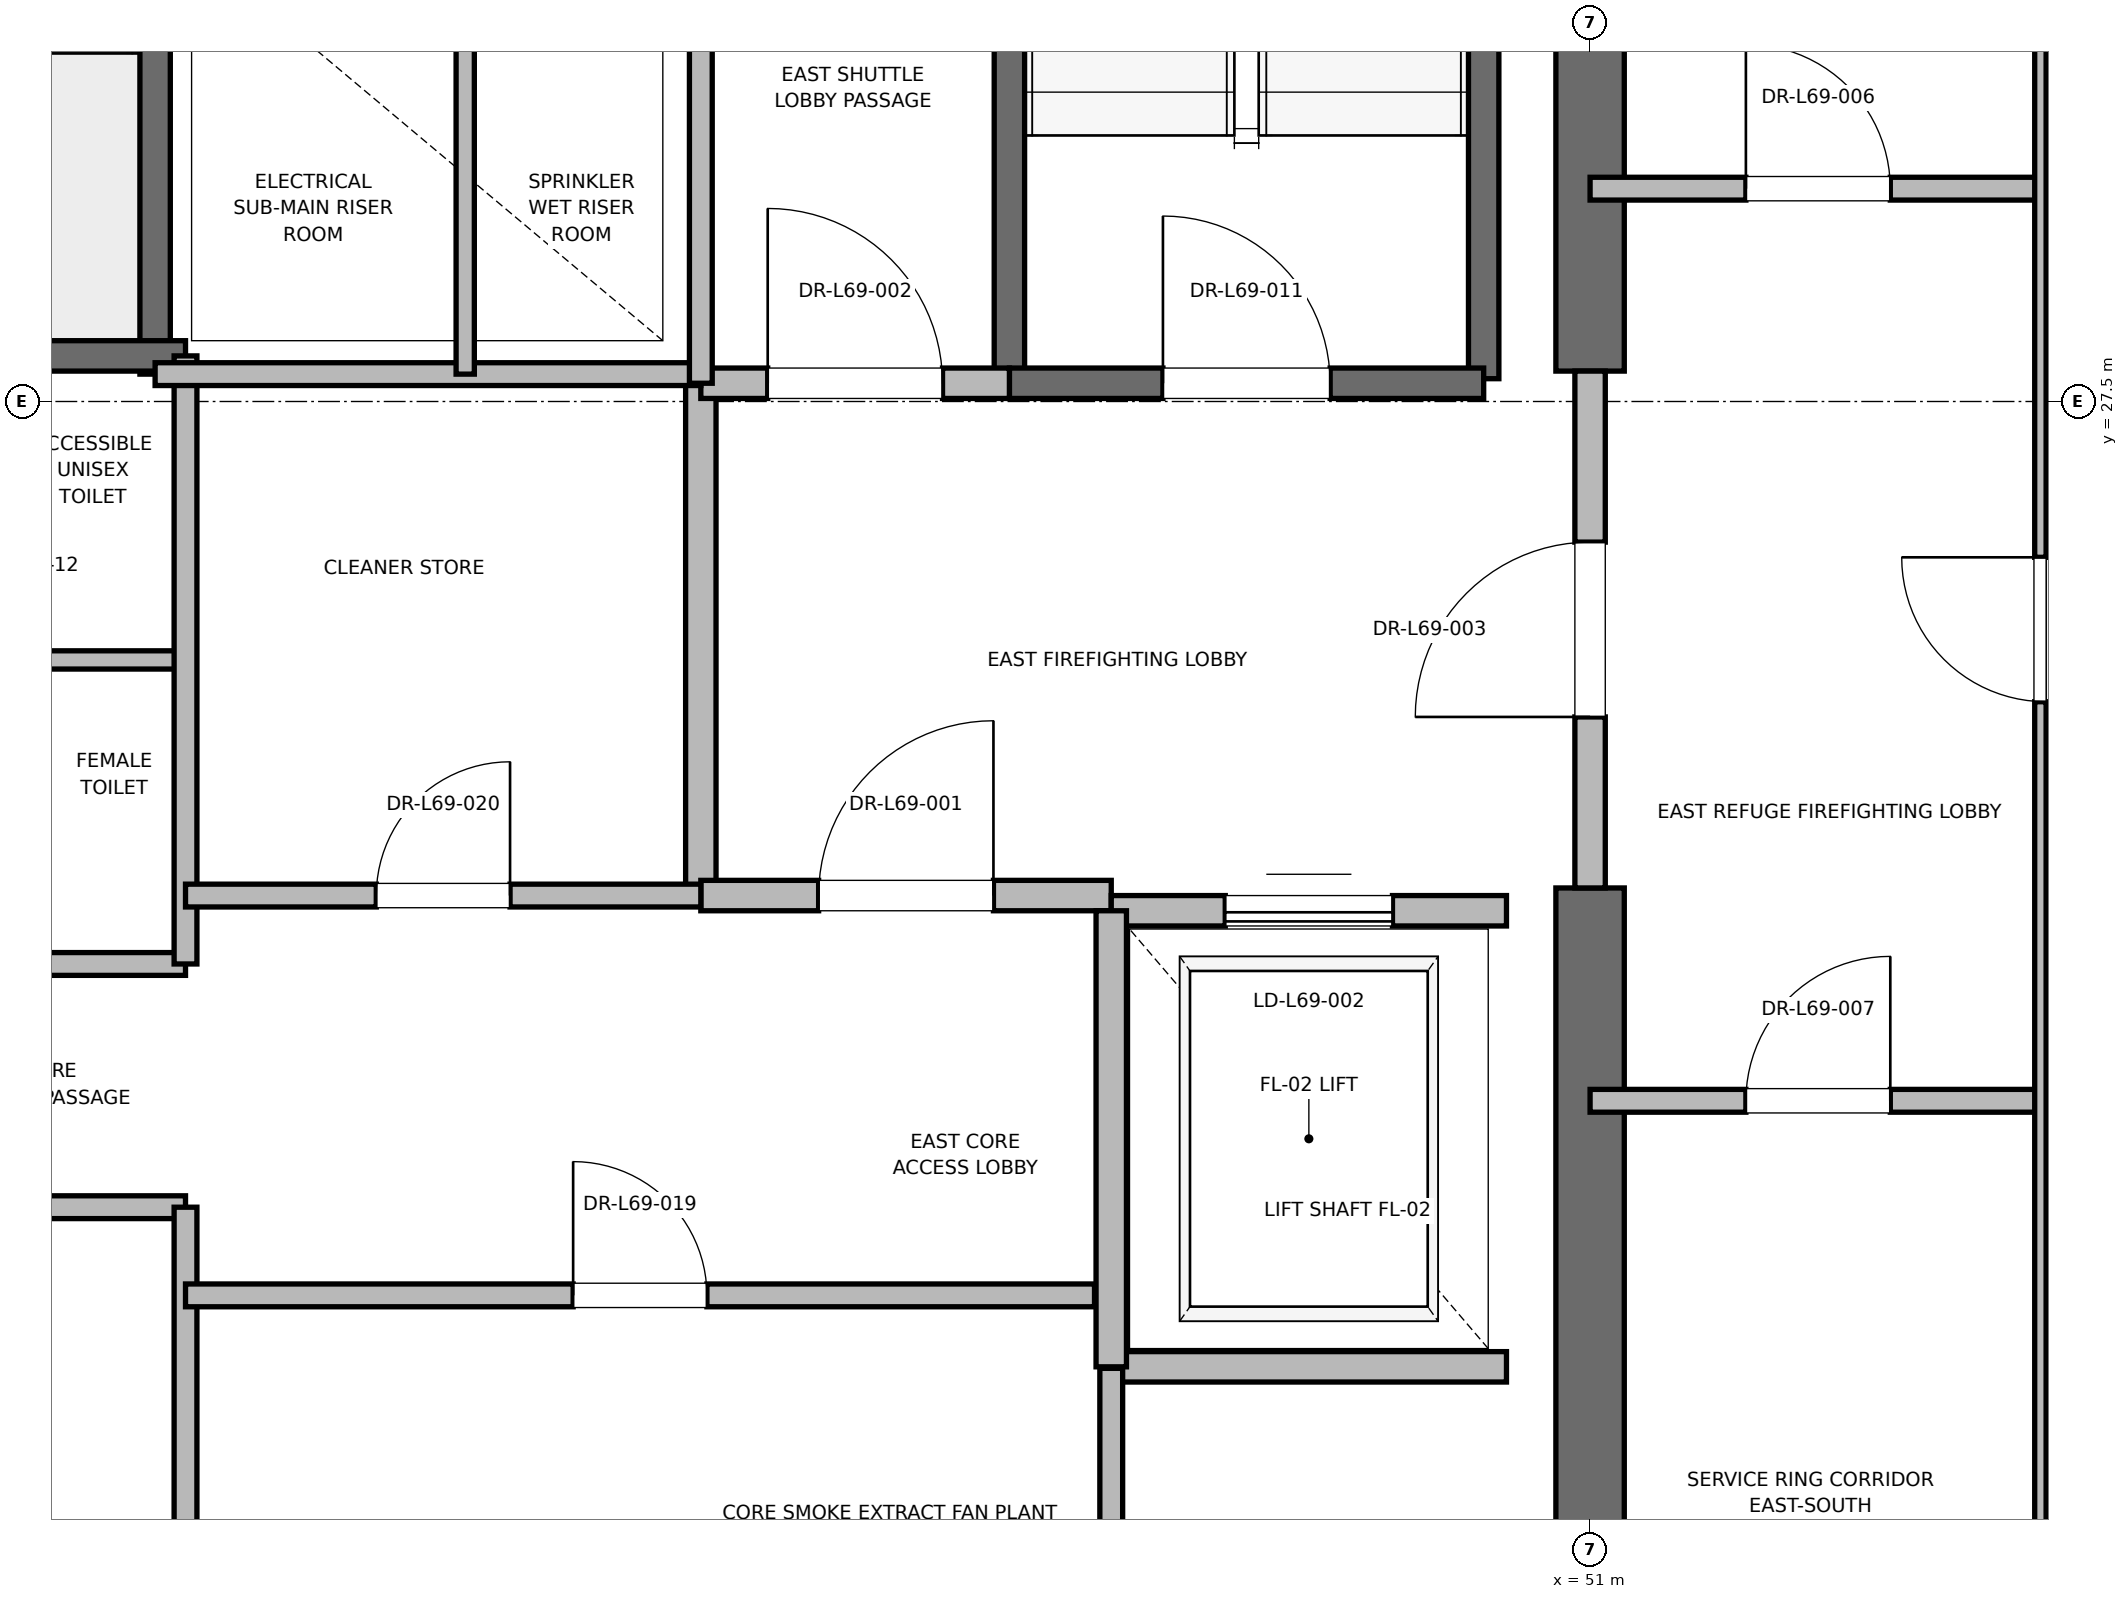
"""IFC4 building model, lengths in metres.
Left out: names, types, materials, properties, quantities, classifications, styles, units other than length and angle.
Written with IfcOpenShell. Run it as: python <this file> out.ifc"""

import sys

from ifc_helpers import new_model, si_unit, direction, frame, frame_2d, origin, place, context, subcontext, project, spatial, rectangle, extrude, element, fill, save


model = new_model("IFC4")
c1 = context("Model", 3, precision=1e-05, world=origin(), true_north=direction((0.0, 1.0)))
c2 = subcontext(c1, "Body", "Model", "MODEL_VIEW")
j1 = project(units=[si_unit("LENGTHUNIT", "METRE"), si_unit("PLANEANGLEUNIT", "RADIAN")], contexts=[c1])
p1 = place(None, origin())
s1 = spatial("IfcSite", under=j1, at=p1, CompositionType="ELEMENT")
p2 = place(p1, origin())
s2 = spatial("IfcBuilding", under=s1, at=p2, CompositionType="ELEMENT")
p3 = place(p2, frame((0.0, 0.0, 295.2)))
s3 = spatial("IfcBuildingStorey", under=s2, at=p3, CompositionType="ELEMENT", Elevation=295.2)
p4 = place(p3, frame((51.0, 18.5, 0.0), z_axis=(0.0, 0.0, 1.0), x_axis=(0.0, 1.0, 0.0)))
e1 = element("IfcWall", 1, at=p4, inside=s3, PredefinedType="SHEAR", context=c2, shape_type="SweptSolid", body=[
    extrude(rectangle(XDim=5.8, YDim=0.45, at=frame_2d((2.9, 0.0))), origin(), (0.0, 0.0, 1.0), 5.5),
])
p5 = place(p3, frame((51.0, 27.7, 0.0), z_axis=(0.0, 0.0, 1.0), x_axis=(0.0, 1.0, 0.0)))
e2 = element("IfcWall", 2, at=p5, inside=s3, PredefinedType="SHEAR", context=c2, shape_type="SweptSolid", body=[
    extrude(rectangle(XDim=8.8, YDim=0.45, at=frame_2d((4.4, 0.0))), origin(), (0.0, 0.0, 1.0), 5.5),
])
p6 = place(p3, frame((50.3, 27.65, 0.0), z_axis=(0.0, 0.0, 1.0), x_axis=(0.0, 1.0, 0.0)))
e3 = element("IfcWall", 3, at=p6, inside=s3, PredefinedType="SOLIDWALL", context=c2, shape_type="SweptSolid", body=[
    extrude(rectangle(XDim=8.15, YDim=0.2, at=frame_2d((4.075, 0.0))), origin(), (0.0, 0.0, 1.0), 5.5),
])
p7 = place(p3, frame((47.18, 27.62, 0.0), z_axis=(0.0, 0.0, 1.0), x_axis=(0.0, 1.0, 0.0)))
e4 = element("IfcWall", 4, at=p7, inside=s3, PredefinedType="SOLIDWALL", context=c2, shape_type="SweptSolid", body=[
    extrude(rectangle(XDim=8.18, YDim=0.2, at=frame_2d((4.09, 0.0))), origin(), (0.0, 0.0, 1.0), 5.5),
])
p8 = place(p3, frame((47.18, 27.62, 0.0), z_axis=(0.0, 0.0, 1.0), x_axis=(1.0, 0.0, 0.0)))
e5 = element("IfcWall", 5, at=p8, inside=s3, PredefinedType="SOLIDWALL", context=c2, shape_type="SweptSolid", body=[
    extrude(rectangle(XDim=3.12, YDim=0.2, at=frame_2d((1.56, 0.0))), origin(), (0.0, 0.0, 1.0), 5.5),
])
p9 = place(p8, frame((1.01, 0.0, 0.0)))
e6 = element("IfcOpeningElement", 6, at=p9, cuts=e5, PredefinedType="OPENING", context=c2, shape_type="SweptSolid", body=[
    extrude(rectangle(XDim=1.1, YDim=2.15, at=frame_2d((0.55, 1.075))), frame((0.0, 0.1, 0.0), z_axis=(0.0, -1.0, 0.0), x_axis=(1.0, 0.0, 0.0)), (0.0, 0.0, 1.0), 0.2),
])
p10 = place(p3, frame((41.56, 27.68, 0.0), z_axis=(0.0, 0.0, 1.0), x_axis=(0.0, 1.0, 0.0)))
e7 = element("IfcWall", 7, at=p10, inside=s3, PredefinedType="SOLIDWALL", context=c2, shape_type="SweptSolid", body=[
    extrude(rectangle(XDim=8.57, YDim=0.2, at=frame_2d((4.285, 0.0))), origin(), (0.0, 0.0, 1.0), 5.5),
])
p11 = place(p3, frame((38.44, 27.8, 0.0), z_axis=(0.0, 0.0, 1.0), x_axis=(1.0, 0.0, 0.0)))
e8 = element("IfcWall", 8, at=p11, inside=s3, PredefinedType="SOLIDWALL", context=c2, shape_type="SweptSolid", body=[
    extrude(rectangle(XDim=3.32, YDim=0.2, at=frame_2d((1.66, 0.0))), origin(), (0.0, 0.0, 1.0), 5.5),
])
p12 = place(p3, frame((45.15, 24.25, 0.0), z_axis=(0.0, 0.0, 1.0), x_axis=(0.0, 1.0, 0.0)))
e9 = element("IfcWall", 9, at=p12, inside=s3, PredefinedType="PARTITIONING", context=c2, shape_type="SweptSolid", body=[
    extrude(rectangle(XDim=3.37, YDim=0.2, at=frame_2d((1.685, 0.0))), origin(), (0.0, 0.0, 1.0), 5.5),
])
p13 = place(p3, frame((45.15, 24.25, 0.0), z_axis=(0.0, 0.0, 1.0), x_axis=(1.0, 0.0, 0.0)))
e10 = element("IfcWall", 10, at=p13, inside=s3, PredefinedType="PARTITIONING", context=c2, shape_type="SweptSolid", body=[
    extrude(rectangle(XDim=2.7, YDim=0.2, at=frame_2d((1.35, 0.0))), origin(), (0.0, 0.0, 1.0), 5.5),
])
p14 = place(p13, frame((0.775, 0.0, 0.0)))
e11 = element("IfcOpeningElement", 11, at=p14, cuts=e10, PredefinedType="OPENING", context=c2, shape_type="SweptSolid", body=[
    extrude(rectangle(XDim=1.15, YDim=2.2, at=frame_2d((0.575, 1.1))), frame((0.0, 0.1, 0.0), z_axis=(0.0, -1.0, 0.0), x_axis=(1.0, 0.0, 0.0)), (0.0, 0.0, 1.0), 0.2),
])
p15 = place(p3, frame((45.15, 27.62, 0.0), z_axis=(0.0, 0.0, 1.0), x_axis=(1.0, 0.0, 0.0)))
e12 = element("IfcWall", 12, at=p15, inside=s3, PredefinedType="PARTITIONING", context=c2, shape_type="SweptSolid", body=[
    extrude(rectangle(XDim=2.03, YDim=0.2, at=frame_2d((1.015, 0.0))), origin(), (0.0, 0.0, 1.0), 5.5),
])
p16 = place(p15, frame((0.44, 0.0, 0.0)))
e13 = element("IfcOpeningElement", 13, at=p16, cuts=e12, PredefinedType="OPENING", context=c2, shape_type="SweptSolid", body=[
    extrude(rectangle(XDim=1.15, YDim=2.2, at=frame_2d((0.575, 1.1))), frame((0.0, 0.1, 0.0), z_axis=(0.0, -1.0, 0.0), x_axis=(1.0, 0.0, 0.0)), (0.0, 0.0, 1.0), 0.2),
])
p17 = place(p3, frame((51.0, 24.3, 0.0), z_axis=(0.0, 0.0, 1.0), x_axis=(0.0, 1.0, 0.0)))
e14 = element("IfcWall", 14, at=p17, inside=s3, PredefinedType="PARTITIONING", context=c2, shape_type="SweptSolid", body=[
    extrude(rectangle(XDim=3.4, YDim=0.2, at=frame_2d((1.7, 0.0))), origin(), (0.0, 0.0, 1.0), 4.58),
])
p18 = place(p17, frame((1.125, 0.0, 0.0)))
e15 = element("IfcOpeningElement", 15, at=p18, cuts=e14, PredefinedType="OPENING", context=c2, shape_type="SweptSolid", body=[
    extrude(rectangle(XDim=1.15, YDim=2.2, at=frame_2d((0.575, 1.1))), frame((0.0, 0.1, 0.0), z_axis=(0.0, -1.0, 0.0), x_axis=(1.0, 0.0, 0.0)), (0.0, 0.0, 1.0), 0.2),
])
p19 = place(p3, frame((47.85, 21.15, 0.0), z_axis=(0.0, 0.0, 1.0), x_axis=(1.0, 0.0, 0.0)))
e16 = element("IfcWall", 16, at=p19, inside=s3, PredefinedType="SOLIDWALL", context=c2, shape_type="SweptSolid", body=[
    extrude(rectangle(XDim=2.6, YDim=0.2, at=frame_2d((1.3, 0.0))), origin(), (0.0, 0.0, 1.0), 5.5),
])
p20 = place(p3, frame((50.45, 24.15, 0.0), z_axis=(0.0, 0.0, 1.0), x_axis=(-1.0, 0.0, 0.0)))
e17 = element("IfcWall", 17, at=p20, inside=s3, PredefinedType="SOLIDWALL", context=c2, shape_type="SweptSolid", body=[
    extrude(rectangle(XDim=2.6, YDim=0.2, at=frame_2d((1.3, 0.0))), origin(), (0.0, 0.0, 1.0), 4.58),
])
p21 = place(p20, frame((0.75, 0.0, 0.0)))
e18 = element("IfcOpeningElement", 18, at=p21, cuts=e17, PredefinedType="OPENING", context=c2, shape_type="SweptSolid", body=[
    extrude(rectangle(XDim=1.1, YDim=2.2, at=frame_2d((0.55, 1.1))), frame((0.0, 0.1, 0.0), z_axis=(0.0, -1.0, 0.0), x_axis=(1.0, 0.0, 0.0)), (0.0, 0.0, 1.0), 0.2),
])
p22 = place(p3, frame((47.85, 24.15, 0.0), z_axis=(0.0, 0.0, 1.0), x_axis=(0.0, -1.0, 0.0)))
e19 = element("IfcWall", 19, at=p22, inside=s3, PredefinedType="SOLIDWALL", context=c2, shape_type="SweptSolid", body=[
    extrude(rectangle(XDim=3.0, YDim=0.2, at=frame_2d((1.5, 0.0))), origin(), (0.0, 0.0, 1.0), 5.5),
])
for number, where, z_axis, x_axis in (
    (20, (39.95, 22.2, 0.0), (0.0, 0.0, 1.0), (1.0, 0.0, 0.0)),
    (21, (39.95, 23.8, 0.0), (0.0, 0.0, 1.0), (1.0, 0.0, 0.0)),
):
    element("IfcWall", number, at=place(p3, frame(where, z_axis=z_axis, x_axis=x_axis)), inside=s3, PredefinedType="PARTITIONING", context=c2, shape_type="SweptSolid", body=[
        extrude(rectangle(XDim=1.81, YDim=0.15, at=frame_2d((0.905, 0.0))), origin(), (0.0, 0.0, 1.0), 2.85),
    ])
p23 = place(p3, frame((39.95, 25.8, 0.0), z_axis=(0.0, 0.0, 1.0), x_axis=(1.0, 0.0, 0.0)))
e22 = element("IfcWall", 22, at=p23, inside=s3, PredefinedType="PARTITIONING", context=c2, shape_type="SweptSolid", body=[
    extrude(rectangle(XDim=1.81, YDim=0.12, at=frame_2d((0.905, 0.0))), origin(), (0.0, 0.0, 1.0), 2.85),
])
p24 = place(p3, frame((41.76, 18.6, 0.0), z_axis=(0.0, 0.0, 1.0), x_axis=(0.0, 1.0, 0.0)))
e23 = element("IfcWall", 23, at=p24, inside=s3, PredefinedType="PARTITIONING", context=c2, shape_type="SweptSolid", body=[
    extrude(rectangle(XDim=3.6, YDim=0.15, at=frame_2d((1.8, 0.0))), origin(), (0.0, 0.0, 1.0), 2.85),
])
p25 = place(p3, frame((41.76, 23.8, 0.0), z_axis=(0.0, 0.0, 1.0), x_axis=(0.0, 1.0, 0.0)))
e24 = element("IfcWall", 24, at=p25, inside=s3, PredefinedType="PARTITIONING", context=c2, shape_type="SweptSolid", body=[
    extrude(rectangle(XDim=4.0, YDim=0.15, at=frame_2d((2.0, 0.0))), origin(), (0.0, 0.0, 1.0), 2.85),
])
p26 = place(p3, frame((41.56, 27.68, 0.0), z_axis=(0.0, 0.0, 1.0), x_axis=(1.0, 0.0, 0.0)))
e25 = element("IfcWall", 25, at=p26, inside=s3, PredefinedType="PARTITIONING", context=c2, shape_type="SweptSolid", body=[
    extrude(rectangle(XDim=3.59, YDim=0.15, at=frame_2d((1.795, 0.0))), origin(), (0.0, 0.0, 1.0), 2.85),
])
p27 = place(p3, frame((47.85, 18.6, 0.0), z_axis=(0.0, 0.0, 1.0), x_axis=(0.0, 1.0, 0.0)))
e26 = element("IfcWall", 26, at=p27, inside=s3, PredefinedType="PARTITIONING", context=c2, shape_type="SweptSolid", body=[
    extrude(rectangle(XDim=2.54, YDim=0.15, at=frame_2d((1.27, 0.0))), origin(), (0.0, 0.0, 1.0), 2.85),
])
p28 = place(p3, frame((41.76, 21.62, 0.0), z_axis=(0.0, 0.0, 1.0), x_axis=(1.0, 0.0, 0.0)))
e27 = element("IfcWall", 27, at=p28, inside=s3, PredefinedType="PARTITIONING", context=c2, shape_type="SweptSolid", body=[
    extrude(rectangle(XDim=5.98, YDim=0.15, at=frame_2d((2.99, 0.0))), origin(), (0.0, 0.0, 1.0), 2.85),
])
p29 = place(p28, frame((2.55, 0.0, 0.0)))
e28 = element("IfcOpeningElement", 28, at=p29, cuts=e27, PredefinedType="OPENING", context=c2, shape_type="SweptSolid", body=[
    extrude(rectangle(XDim=0.88, YDim=2.1, at=frame_2d((0.44, 1.05))), frame((0.0, 0.075, 0.0), z_axis=(0.0, -1.0, 0.0), x_axis=(1.0, 0.0, 0.0)), (0.0, 0.0, 1.0), 0.15),
])
p30 = place(p3, frame((41.76, 24.25, 0.0), z_axis=(0.0, 0.0, 1.0), x_axis=(1.0, 0.0, 0.0)))
e29 = element("IfcWall", 29, at=p30, inside=s3, PredefinedType="PARTITIONING", context=c2, shape_type="SweptSolid", body=[
    extrude(rectangle(XDim=3.39, YDim=0.15, at=frame_2d((1.695, 0.0))), origin(), (0.0, 0.0, 1.0), 2.85),
])
p31 = place(p30, frame((1.255, 0.0, 0.0)))
e30 = element("IfcOpeningElement", 30, at=p31, cuts=e29, PredefinedType="OPENING", context=c2, shape_type="SweptSolid", body=[
    extrude(rectangle(XDim=0.88, YDim=2.1, at=frame_2d((0.44, 1.05))), frame((0.0, 0.075, 0.0), z_axis=(0.0, -1.0, 0.0), x_axis=(1.0, 0.0, 0.0)), (0.0, 0.0, 1.0), 0.15),
])
p32 = place(p3, frame((45.15, 27.62, 0.0), z_axis=(0.0, 0.0, 1.0), x_axis=(0.0, 1.0, 0.0)))
e31 = element("IfcWall", 31, at=p32, inside=s3, PredefinedType="PARTITIONING", context=c2, shape_type="SweptSolid", body=[
    extrude(rectangle(XDim=3.1, YDim=0.15, at=frame_2d((1.55, 0.0))), origin(), (0.0, 0.0, 1.0), 2.85),
])
p33 = place(p3, frame((43.6, 27.68, 0.0), z_axis=(0.0, 0.0, 1.0), x_axis=(0.0, 1.0, 0.0)))
e32 = element("IfcWall", 32, at=p33, inside=s3, PredefinedType="PARTITIONING", context=c2, shape_type="SweptSolid", body=[
    extrude(rectangle(XDim=3.04, YDim=0.12, at=frame_2d((1.52, 0.0))), origin(), (0.0, 0.0, 1.0), 2.85),
])
p34 = place(p3, frame((51.0, 22.9, 0.0), z_axis=(0.0, 0.0, 1.0), x_axis=(1.0, 0.0, 0.0)))
e33 = element("IfcWall", 33, at=p34, inside=s3, PredefinedType="PARTITIONING", context=c2, shape_type="SweptSolid", body=[
    extrude(rectangle(XDim=3.0, YDim=0.15, at=frame_2d((1.5, 0.0))), origin(), (0.0, 0.0, 1.0), 2.85),
])
p35 = place(p34, frame((1.025, 0.0, 0.0)))
e34 = element("IfcOpeningElement", 34, at=p35, cuts=e33, PredefinedType="OPENING", context=c2, shape_type="SweptSolid", body=[
    extrude(rectangle(XDim=0.95, YDim=2.15, at=frame_2d((0.475, 1.075))), frame((0.0, 0.075, 0.0), z_axis=(0.0, -1.0, 0.0), x_axis=(1.0, 0.0, 0.0)), (0.0, 0.0, 1.0), 0.15),
])
p36 = place(p3, frame((51.0, 28.9, 0.0), z_axis=(0.0, 0.0, 1.0), x_axis=(1.0, 0.0, 0.0)))
e35 = element("IfcWall", 35, at=p36, inside=s3, PredefinedType="PARTITIONING", context=c2, shape_type="SweptSolid", body=[
    extrude(rectangle(XDim=3.0, YDim=0.15, at=frame_2d((1.5, 0.0))), origin(), (0.0, 0.0, 1.0), 2.85),
])
p37 = place(p36, frame((1.025, 0.0, 0.0)))
e36 = element("IfcOpeningElement", 36, at=p37, cuts=e35, PredefinedType="OPENING", context=c2, shape_type="SweptSolid", body=[
    extrude(rectangle(XDim=0.95, YDim=2.15, at=frame_2d((0.475, 1.075))), frame((0.0, 0.075, 0.0), z_axis=(0.0, -1.0, 0.0), x_axis=(1.0, 0.0, 0.0)), (0.0, 0.0, 1.0), 0.15),
])
p38 = place(p3, frame((54.0, 18.7, 0.0), z_axis=(0.0, 0.0, 1.0), x_axis=(0.0, 1.0, 0.0)))
e37 = element("IfcWall", 37, at=p38, inside=s3, PredefinedType="PARTITIONING", context=c2, shape_type="SweptSolid", body=[
    extrude(rectangle(XDim=11.8, YDim=0.15, at=frame_2d((5.9, 0.0))), origin(), (0.0, 0.0, 1.0), 2.85),
])
p39 = place(p38, frame((6.825, 0.0, 0.0)))
e38 = element("IfcOpeningElement", 38, at=p39, cuts=e37, PredefinedType="OPENING", context=c2, shape_type="SweptSolid", body=[
    extrude(rectangle(XDim=0.95, YDim=2.15, at=frame_2d((0.475, 1.075))), frame((0.0, 0.075, 0.0), z_axis=(0.0, -1.0, 0.0), x_axis=(1.0, 0.0, 0.0)), (0.0, 0.0, 1.0), 0.15),
])
p40 = place(p9, origin())
e39 = element("IfcDoor", 39, at=p40, inside=s3, OperationType="SINGLE_SWING_LEFT", PredefinedType="DOOR", context=c2, shape_type="SweptSolid", body=[
    extrude(rectangle(XDim=1.1, YDim=2.15, at=frame_2d((0.55, 1.075))), frame((0.0, 0.025, 0.0), z_axis=(0.0, -1.0, 0.0), x_axis=(1.0, 0.0, 0.0)), (0.0, 0.0, 1.0), 0.05),
])
fill(e6, e39)
p41 = place(p14, origin())
e40 = element("IfcDoor", 40, at=p41, inside=s3, OperationType="SINGLE_SWING_RIGHT", PredefinedType="DOOR", context=c2, shape_type="SweptSolid", body=[
    extrude(rectangle(XDim=1.15, YDim=2.2, at=frame_2d((0.575, 1.1))), frame((0.0, 0.025, 0.0), z_axis=(0.0, -1.0, 0.0), x_axis=(1.0, 0.0, 0.0)), (0.0, 0.0, 1.0), 0.05),
])
fill(e11, e40)
p42 = place(p16, origin())
e41 = element("IfcDoor", 41, at=p42, inside=s3, OperationType="SINGLE_SWING_LEFT", PredefinedType="DOOR", context=c2, shape_type="SweptSolid", body=[
    extrude(rectangle(XDim=1.15, YDim=2.2, at=frame_2d((0.575, 1.1))), frame((0.0, 0.025, 0.0), z_axis=(0.0, -1.0, 0.0), x_axis=(1.0, 0.0, 0.0)), (0.0, 0.0, 1.0), 0.05),
])
fill(e13, e41)
p43 = place(p18, origin())
e42 = element("IfcDoor", 42, at=p43, inside=s3, OperationType="SINGLE_SWING_LEFT", PredefinedType="DOOR", context=c2, shape_type="SweptSolid", body=[
    extrude(rectangle(XDim=1.15, YDim=2.2, at=frame_2d((0.575, 1.1))), frame((0.0, 0.025, 0.0), z_axis=(0.0, -1.0, 0.0), x_axis=(1.0, 0.0, 0.0)), (0.0, 0.0, 1.0), 0.05),
])
fill(e15, e42)
p44 = place(p21, origin())
e43 = element("IfcDoor", 43, at=p44, inside=s3, OperationType="SLIDING_TO_RIGHT", PredefinedType="DOOR", context=c2, shape_type="SweptSolid", body=[
    extrude(rectangle(XDim=1.1, YDim=2.2, at=frame_2d((0.55, 1.1))), frame((0.0, 0.025, 0.0), z_axis=(0.0, -1.0, 0.0), x_axis=(1.0, 0.0, 0.0)), (0.0, 0.0, 1.0), 0.05),
])
fill(e18, e43)
p45 = place(p29, origin())
e44 = element("IfcDoor", 44, at=p45, inside=s3, OperationType="SINGLE_SWING_LEFT", PredefinedType="DOOR", context=c2, shape_type="SweptSolid", body=[
    extrude(rectangle(XDim=0.88, YDim=2.1, at=frame_2d((0.44, 1.05))), frame((0.0, 0.025, 0.0), z_axis=(0.0, -1.0, 0.0), x_axis=(1.0, 0.0, 0.0)), (0.0, 0.0, 1.0), 0.05),
])
fill(e28, e44)
p46 = place(p31, origin())
e45 = element("IfcDoor", 45, at=p46, inside=s3, OperationType="SINGLE_SWING_RIGHT", PredefinedType="DOOR", context=c2, shape_type="SweptSolid", body=[
    extrude(rectangle(XDim=0.88, YDim=2.1, at=frame_2d((0.44, 1.05))), frame((0.0, 0.025, 0.0), z_axis=(0.0, -1.0, 0.0), x_axis=(1.0, 0.0, 0.0)), (0.0, 0.0, 1.0), 0.05),
])
fill(e30, e45)
p47 = place(p35, origin())
e46 = element("IfcDoor", 46, at=p47, inside=s3, OperationType="SINGLE_SWING_RIGHT", PredefinedType="DOOR", context=c2, shape_type="SweptSolid", body=[
    extrude(rectangle(XDim=0.95, YDim=2.15, at=frame_2d((0.475, 1.075))), frame((0.0, 0.025, 0.0), z_axis=(0.0, -1.0, 0.0), x_axis=(1.0, 0.0, 0.0)), (0.0, 0.0, 1.0), 0.05),
])
fill(e34, e46)
p48 = place(p37, origin())
e47 = element("IfcDoor", 47, at=p48, inside=s3, OperationType="SINGLE_SWING_LEFT", PredefinedType="DOOR", context=c2, shape_type="SweptSolid", body=[
    extrude(rectangle(XDim=0.95, YDim=2.15, at=frame_2d((0.475, 1.075))), frame((0.0, 0.025, 0.0), z_axis=(0.0, -1.0, 0.0), x_axis=(1.0, 0.0, 0.0)), (0.0, 0.0, 1.0), 0.05),
])
fill(e36, e47)
p49 = place(p39, origin())
e48 = element("IfcDoor", 48, at=p49, inside=s3, OperationType="SINGLE_SWING_RIGHT", PredefinedType="DOOR", context=c2, shape_type="SweptSolid", body=[
    extrude(rectangle(XDim=0.95, YDim=2.15, at=frame_2d((0.475, 1.075))), frame((0.0, 0.025, 0.0), z_axis=(0.0, -1.0, 0.0), x_axis=(1.0, 0.0, 0.0)), (0.0, 0.0, 1.0), 0.05),
])
fill(e38, e48)
save(model, sys.argv[1])
